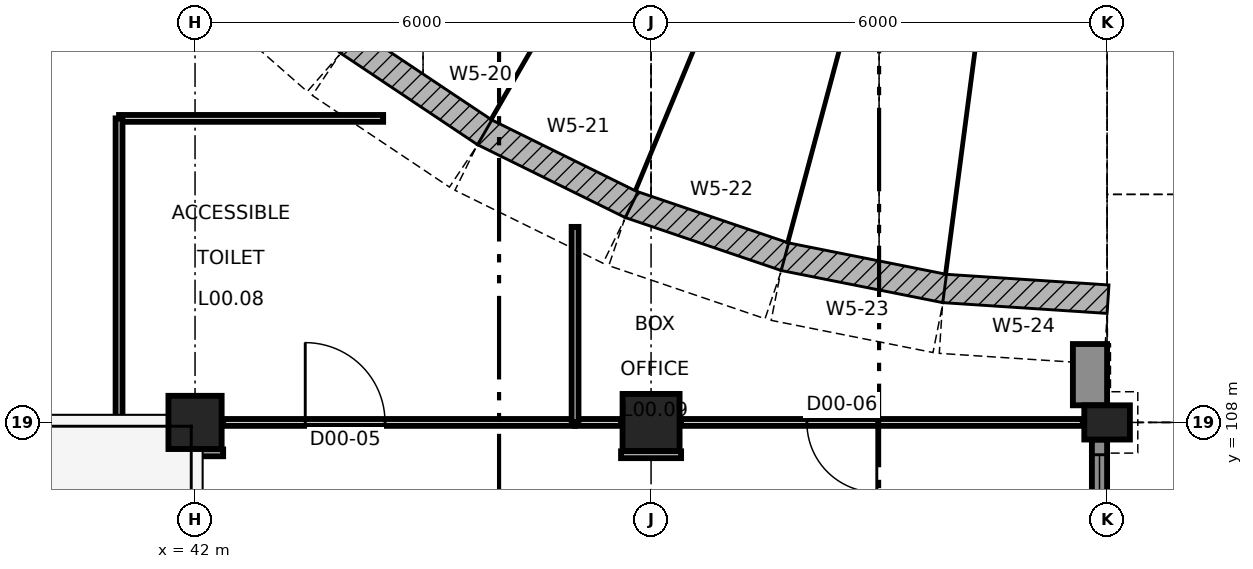
"""IFC4 building model, lengths in metres.
Left out: names, types, materials, properties, quantities, classifications, styles, units other than length and angle.
Written with IfcOpenShell. Run it as: python <this file> out.ifc"""

import sys

from ifc_helpers import new_model, si_unit, direction, frame, frame_2d, origin, origin_2d, place, context, subcontext, project, spatial, polyline, rectangle, outline, extrude, element, fill, save


model = new_model("IFC4")
c1 = context("Model", 3, precision=1e-05, world=origin(), true_north=direction((0.0, 1.0)))
c2 = subcontext(c1, "Body", "Model", "MODEL_VIEW")
j1 = project(units=[si_unit("LENGTHUNIT", "METRE"), si_unit("PLANEANGLEUNIT", "RADIAN")], contexts=[c1])
p1 = place(None, origin())
s1 = spatial("IfcSite", under=j1, at=p1, CompositionType="ELEMENT")
p2 = place(p1, origin())
s2 = spatial("IfcBuilding", under=s1, at=p2, CompositionType="ELEMENT")
p3 = place(p2, origin())
s3 = spatial("IfcBuildingStorey", under=s2, at=p3, CompositionType="ELEMENT", Elevation=0.0)
p4 = place(p3, frame((42.0, 108.0, -0.3), z_axis=(0.0, 0.0, 1.0), x_axis=(1.0, 0.0, 0.0)))
e1 = element("IfcColumn", 1, at=p4, inside=s3, PredefinedType="COLUMN", context=c2, shape_type="SweptSolid", body=[
    extrude(rectangle(XDim=0.7, YDim=0.7, at=origin_2d()), origin(), (0.0, 0.0, 1.0), 7.3),
])
p5 = place(p3, frame((48.0, 108.0, -0.3), z_axis=(0.0, 0.0, 1.0), x_axis=(1.0, 0.0, 0.0)))
e2 = element("IfcColumn", 2, at=p5, inside=s3, PredefinedType="COLUMN", context=c2, shape_type="SweptSolid", body=[
    extrude(rectangle(XDim=0.75, YDim=0.75, at=origin_2d()), origin(), (0.0, 0.0, 1.0), 7.3),
])
p6 = place(p3, frame((54.0, 108.0, -0.3), z_axis=(0.0, 0.0, 1.0), x_axis=(1.0, 0.0, 0.0)))
e3 = element("IfcColumn", 3, at=p6, inside=s3, PredefinedType="COLUMN", context=c2, shape_type="SweptSolid", body=[
    extrude(rectangle(XDim=0.6, YDim=0.45, at=origin_2d()), origin(), (0.0, 0.0, 1.0), 7.3),
])
p7 = place(p3, frame((43.916, 112.857, -0.3), z_axis=(-0.494389341921, -0.563727278577, 0.6616575655), x_axis=(-0.751836246232, 0.659349875833, -9.545532e-06)))
e4 = element("IfcWall", 4, at=p7, inside=s3, PredefinedType="SOLIDWALL", context=c2, shape_type="SweptSolid", body=[
    extrude(outline(polyline([(0.0, 0.0), (2.167, 0.0), (1.765, -9.269), (0.402, -9.269), (0.0, 0.0)])), origin(), (-5.389e-06, 0.662, 0.75), 0.667),
])
p8 = place(p3, frame((45.717, 111.654, -0.3), z_axis=(-0.416561116022, -0.623441381436, 0.661662814832), x_axis=(-0.831461145053, 0.555582904203, 2.8701608e-05)))
e5 = element("IfcWall", 5, at=p8, inside=s3, PredefinedType="SOLIDWALL", context=c2, shape_type="SweptSolid", body=[
    extrude(outline(polyline([(0.0, 0.0), (2.167, 0.0), (1.765, -9.269), (0.402, -9.269), (0.0, 0.0)])), origin(), (-1.565e-05, 0.662, 0.75), 0.667),
])
p9 = place(p3, frame((47.661, 110.695, -0.3), z_axis=(-0.331623051487, -0.67247802402, 0.661664158719), x_axis=(-0.896883210339, 0.442267460576, -1.8134674e-05)))
e6 = element("IfcWall", 6, at=p9, inside=s3, PredefinedType="SOLIDWALL", context=c2, shape_type="SweptSolid", body=[
    extrude(outline(polyline([(0.0, 0.0), (2.167, 1.11e-16), (1.764, -9.269), (0.402, -9.269), (0.0, 0.0)])), origin(), (2.383e-05, 0.662, 0.75), 0.667),
])
p10 = place(p3, frame((49.713, 109.999, -0.3), z_axis=(-0.241022741766, -0.710000727249, 0.661669861228), x_axis=(-0.946914536157, 0.321485395559, 4.0695407e-05)))
e7 = element("IfcWall", 7, at=p10, inside=s3, PredefinedType="SOLIDWALL", context=c2, shape_type="SweptSolid", body=[
    extrude(outline(polyline([(0.0, 0.0), (2.167, -1.11e-16), (1.766, -9.269), (0.403, -9.269), (0.0, 0.0)])), origin(), (-4.89e-05, 0.662, 0.75), 0.667),
])
p11 = place(p3, frame((51.838, 109.576, -0.3), z_axis=(-0.146257877538, -0.73538668284, 0.661675947847), x_axis=(-0.980793118363, 0.195050913102, -1.6436784e-05)))
e8 = element("IfcWall", 8, at=p11, inside=s3, PredefinedType="SOLIDWALL", context=c2, shape_type="SweptSolid", body=[
    extrude(outline(polyline([(0.0, 0.0), (2.167, -5.551e-17), (1.764, -9.269), (0.402, -9.269), (0.0, 0.0)])), origin(), (3.992e-05, 0.662, 0.75), 0.667),
])
p12 = place(p3, frame((54.0, 109.434, -0.3), z_axis=(-0.049059370702, -0.748181333112, 0.661678071972), x_axis=(-0.997856134421, 0.065445662351, 1.6668073e-05)))
e9 = element("IfcWall", 9, at=p12, inside=s3, PredefinedType="SOLIDWALL", context=c2, shape_type="SweptSolid", body=[
    extrude(outline(polyline([(0.0, 0.0), (2.167, -1.388e-17), (1.765, -9.269), (0.402, -9.269), (0.0, 0.0)])), origin(), (-4.276e-05, 0.662, 0.75), 0.667),
])
p13 = place(p3, frame((53.775, 109.031, 0.0), z_axis=(0.0, 0.0, 1.0), x_axis=(0.0, -1.0, 0.0)))
e10 = element("IfcWall", 10, at=p13, inside=s3, PredefinedType="SOLIDWALL", context=c2, shape_type="SweptSolid", body=[
    extrude(rectangle(XDim=0.806, YDim=0.45, at=frame_2d((0.403, 0.0))), origin(), (0.0, 0.0, 1.0), 6.65),
])
p14 = place(p3, frame((53.9, 107.775, 0.0), z_axis=(0.0, 0.0, 1.0), x_axis=(0.0, -1.0, 0.0)))
e11 = element("IfcWall", 11, at=p14, inside=s3, PredefinedType="SOLIDWALL", context=c2, shape_type="SweptSolid", body=[
    extrude(rectangle(XDim=5.775, YDim=0.2, at=frame_2d((2.887, 0.0))), origin(), (0.0, 0.0, 1.0), 6.15),
])
p15 = place(p14, frame((1.905, 0.0, 0.0)))
e12 = element("IfcOpeningElement", 12, at=p15, cuts=e11, PredefinedType="OPENING", context=c2, shape_type="SweptSolid", body=[
    extrude(rectangle(XDim=1.8, YDim=2.4, at=frame_2d((0.9, 1.2))), frame((0.0, 0.11, 0.0), z_axis=(0.0, -1.0, 0.0), x_axis=(1.0, 0.0, 0.0)), (0.0, 0.0, 1.0), 0.22),
])
p16 = place(p14, frame((1.905, 0.0, 2.5)))
e13 = element("IfcOpeningElement", 13, at=p16, cuts=e11, PredefinedType="OPENING", context=c2, shape_type="SweptSolid", body=[
    extrude(rectangle(XDim=1.8, YDim=3.3, at=frame_2d((0.9, 1.65))), frame((0.0, 0.11, 0.0), z_axis=(0.0, -1.0, 0.0), x_axis=(1.0, 0.0, 0.0)), (0.0, 0.0, 1.0), 0.22),
])
p17 = place(p14, frame((0.2, 0.0, 0.1)))
e14 = element("IfcOpeningElement", 14, at=p17, cuts=e11, PredefinedType="OPENING", context=c2, shape_type="SweptSolid", body=[
    extrude(rectangle(XDim=1.705, YDim=5.7, at=frame_2d((0.853, 2.85))), frame((0.0, 0.11, 0.0), z_axis=(0.0, -1.0, 0.0), x_axis=(1.0, 0.0, 0.0)), (0.0, 0.0, 1.0), 0.22),
])
p18 = place(p14, frame((3.705, 0.0, 0.1)))
e15 = element("IfcOpeningElement", 15, at=p18, cuts=e11, PredefinedType="OPENING", context=c2, shape_type="SweptSolid", body=[
    extrude(rectangle(XDim=1.87, YDim=5.7, at=frame_2d((0.935, 2.85))), frame((0.0, 0.11, 0.0), z_axis=(0.0, -1.0, 0.0), x_axis=(1.0, 0.0, 0.0)), (0.0, 0.0, 1.0), 0.22),
])
p19 = place(p3, frame((41.0, 112.0, 0.0), z_axis=(0.0, 0.0, 1.0), x_axis=(1.0, 0.0, 0.0)))
e16 = element("IfcWall", 16, at=p19, inside=s3, PredefinedType="PARTITIONING", context=c2, shape_type="SweptSolid", body=[
    extrude(rectangle(XDim=3.475, YDim=0.09, at=frame_2d((1.738, 0.0))), origin(), (0.0, 0.0, 1.0), 6.75),
])
p20 = place(p3, frame((41.0, 108.0, 0.0), z_axis=(0.0, 0.0, 1.0), x_axis=(0.0, 1.0, 0.0)))
e17 = element("IfcWall", 17, at=p20, inside=s3, PredefinedType="PARTITIONING", context=c2, shape_type="SweptSolid", body=[
    extrude(rectangle(XDim=4.0, YDim=0.09, at=frame_2d((2.0, 0.0))), origin(), (0.0, 0.0, 1.0), 2.75),
])
p21 = place(p3, frame((41.0, 108.0, 0.0), z_axis=(0.0, 0.0, 1.0), x_axis=(1.0, 0.0, 0.0)))
e18 = element("IfcWall", 18, at=p21, inside=s3, PredefinedType="PARTITIONING", context=c2, shape_type="SweptSolid", body=[
    extrude(rectangle(XDim=0.63, YDim=0.09, at=frame_2d((0.315, 0.0))), origin(), (0.0, 0.0, 1.0), 2.75),
])
p22 = place(p3, frame((42.37, 108.0, 0.0), z_axis=(0.0, 0.0, 1.0), x_axis=(1.0, 0.0, 0.0)))
e19 = element("IfcWall", 19, at=p22, inside=s3, PredefinedType="PARTITIONING", context=c2, shape_type="SweptSolid", body=[
    extrude(rectangle(XDim=4.63, YDim=0.09, at=frame_2d((2.315, 0.0))), origin(), (0.0, 0.0, 1.0), 6.05),
])
p23 = place(p22, frame((1.08, 0.0, 0.0)))
e20 = element("IfcOpeningElement", 20, at=p23, cuts=e19, PredefinedType="OPENING", context=c2, shape_type="SweptSolid", body=[
    extrude(rectangle(XDim=1.05, YDim=2.1, at=frame_2d((0.525, 1.05))), frame((0.0, 0.055, 0.0), z_axis=(0.0, -1.0, 0.0), x_axis=(1.0, 0.0, 0.0)), (0.0, 0.0, 1.0), 0.11),
])
p24 = place(p3, frame((41.63, 107.6, 0.0), z_axis=(0.0, 0.0, 1.0), x_axis=(1.0, 0.0, 0.0)))
e21 = element("IfcWall", 21, at=p24, inside=s3, PredefinedType="PARTITIONING", context=c2, shape_type="SweptSolid", body=[
    extrude(rectangle(XDim=0.74, YDim=0.09, at=frame_2d((0.37, 0.0))), origin(), (0.0, 0.0, 1.0), 2.75),
])
p25 = place(p3, frame((47.0, 108.0, 0.0), z_axis=(0.0, 0.0, 1.0), x_axis=(1.0, 0.0, 0.0)))
e22 = element("IfcWall", 22, at=p25, inside=s3, PredefinedType="PARTITIONING", context=c2, shape_type="SweptSolid", body=[
    extrude(rectangle(XDim=0.605, YDim=0.09, at=frame_2d((0.302, 0.0))), origin(), (0.0, 0.0, 1.0), 6.05),
])
p26 = place(p3, frame((48.395, 108.0, 0.0), z_axis=(0.0, 0.0, 1.0), x_axis=(1.0, 0.0, 0.0)))
e23 = element("IfcWall", 23, at=p26, inside=s3, PredefinedType="PARTITIONING", context=c2, shape_type="SweptSolid", body=[
    extrude(rectangle(XDim=5.285, YDim=0.09, at=frame_2d((2.643, 0.0))), origin(), (0.0, 0.0, 1.0), 6.05),
])
p27 = place(p26, frame((1.655, 0.0, 0.0)))
e24 = element("IfcOpeningElement", 24, at=p27, cuts=e23, PredefinedType="OPENING", context=c2, shape_type="SweptSolid", body=[
    extrude(rectangle(XDim=0.92, YDim=2.04, at=frame_2d((0.46, 1.02))), frame((0.0, 0.055, 0.0), z_axis=(0.0, -1.0, 0.0), x_axis=(1.0, 0.0, 0.0)), (0.0, 0.0, 1.0), 0.11),
])
p28 = place(p3, frame((47.605, 107.575, 0.0), z_axis=(0.0, 0.0, 1.0), x_axis=(1.0, 0.0, 0.0)))
e25 = element("IfcWall", 25, at=p28, inside=s3, PredefinedType="PARTITIONING", context=c2, shape_type="SweptSolid", body=[
    extrude(rectangle(XDim=0.79, YDim=0.09, at=frame_2d((0.395, 0.0))), origin(), (0.0, 0.0, 1.0), 6.15),
])
p29 = place(p3, frame((47.0, 108.0, 0.0), z_axis=(0.0, 0.0, 1.0), x_axis=(0.0, 1.0, 0.0)))
e26 = element("IfcWall", 26, at=p29, inside=s3, PredefinedType="PARTITIONING", context=c2, shape_type="SweptSolid", body=[
    extrude(rectangle(XDim=2.573, YDim=0.09, at=frame_2d((1.286, 0.0))), origin(), (0.0, 0.0, 1.0), 6.05),
])
p30 = place(p17, origin())
e27 = element("IfcWindow", 27, at=p30, inside=s3, PartitioningType="SINGLE_PANEL", PredefinedType="WINDOW", context=c2, shape_type="SweptSolid", body=[
    extrude(rectangle(XDim=1.705, YDim=5.7, at=frame_2d((0.853, 2.85))), frame((0.0, 0.03, 0.0), z_axis=(0.0, -1.0, 0.0), x_axis=(1.0, 0.0, 0.0)), (0.0, 0.0, 1.0), 0.06),
])
fill(e14, e27)
p31 = place(p23, origin())
e28 = element("IfcDoor", 28, at=p31, inside=s3, OperationType="SINGLE_SWING_LEFT", PredefinedType="DOOR", context=c2, shape_type="SweptSolid", body=[
    extrude(rectangle(XDim=1.05, YDim=2.1, at=frame_2d((0.525, 1.05))), frame((0.0, 0.025, 0.0), z_axis=(0.0, -1.0, 0.0), x_axis=(1.0, 0.0, 0.0)), (0.0, 0.0, 1.0), 0.05),
])
fill(e20, e28)
p32 = place(p27, origin())
e29 = element("IfcDoor", 29, at=p32, inside=s3, OperationType="SINGLE_SWING_RIGHT", PredefinedType="DOOR", context=c2, shape_type="SweptSolid", body=[
    extrude(rectangle(XDim=0.92, YDim=2.04, at=frame_2d((0.46, 1.02))), frame((0.0, 0.025, 0.0), z_axis=(0.0, -1.0, 0.0), x_axis=(1.0, 0.0, 0.0)), (0.0, 0.0, 1.0), 0.05),
])
fill(e24, e29)
save(model, sys.argv[1])
